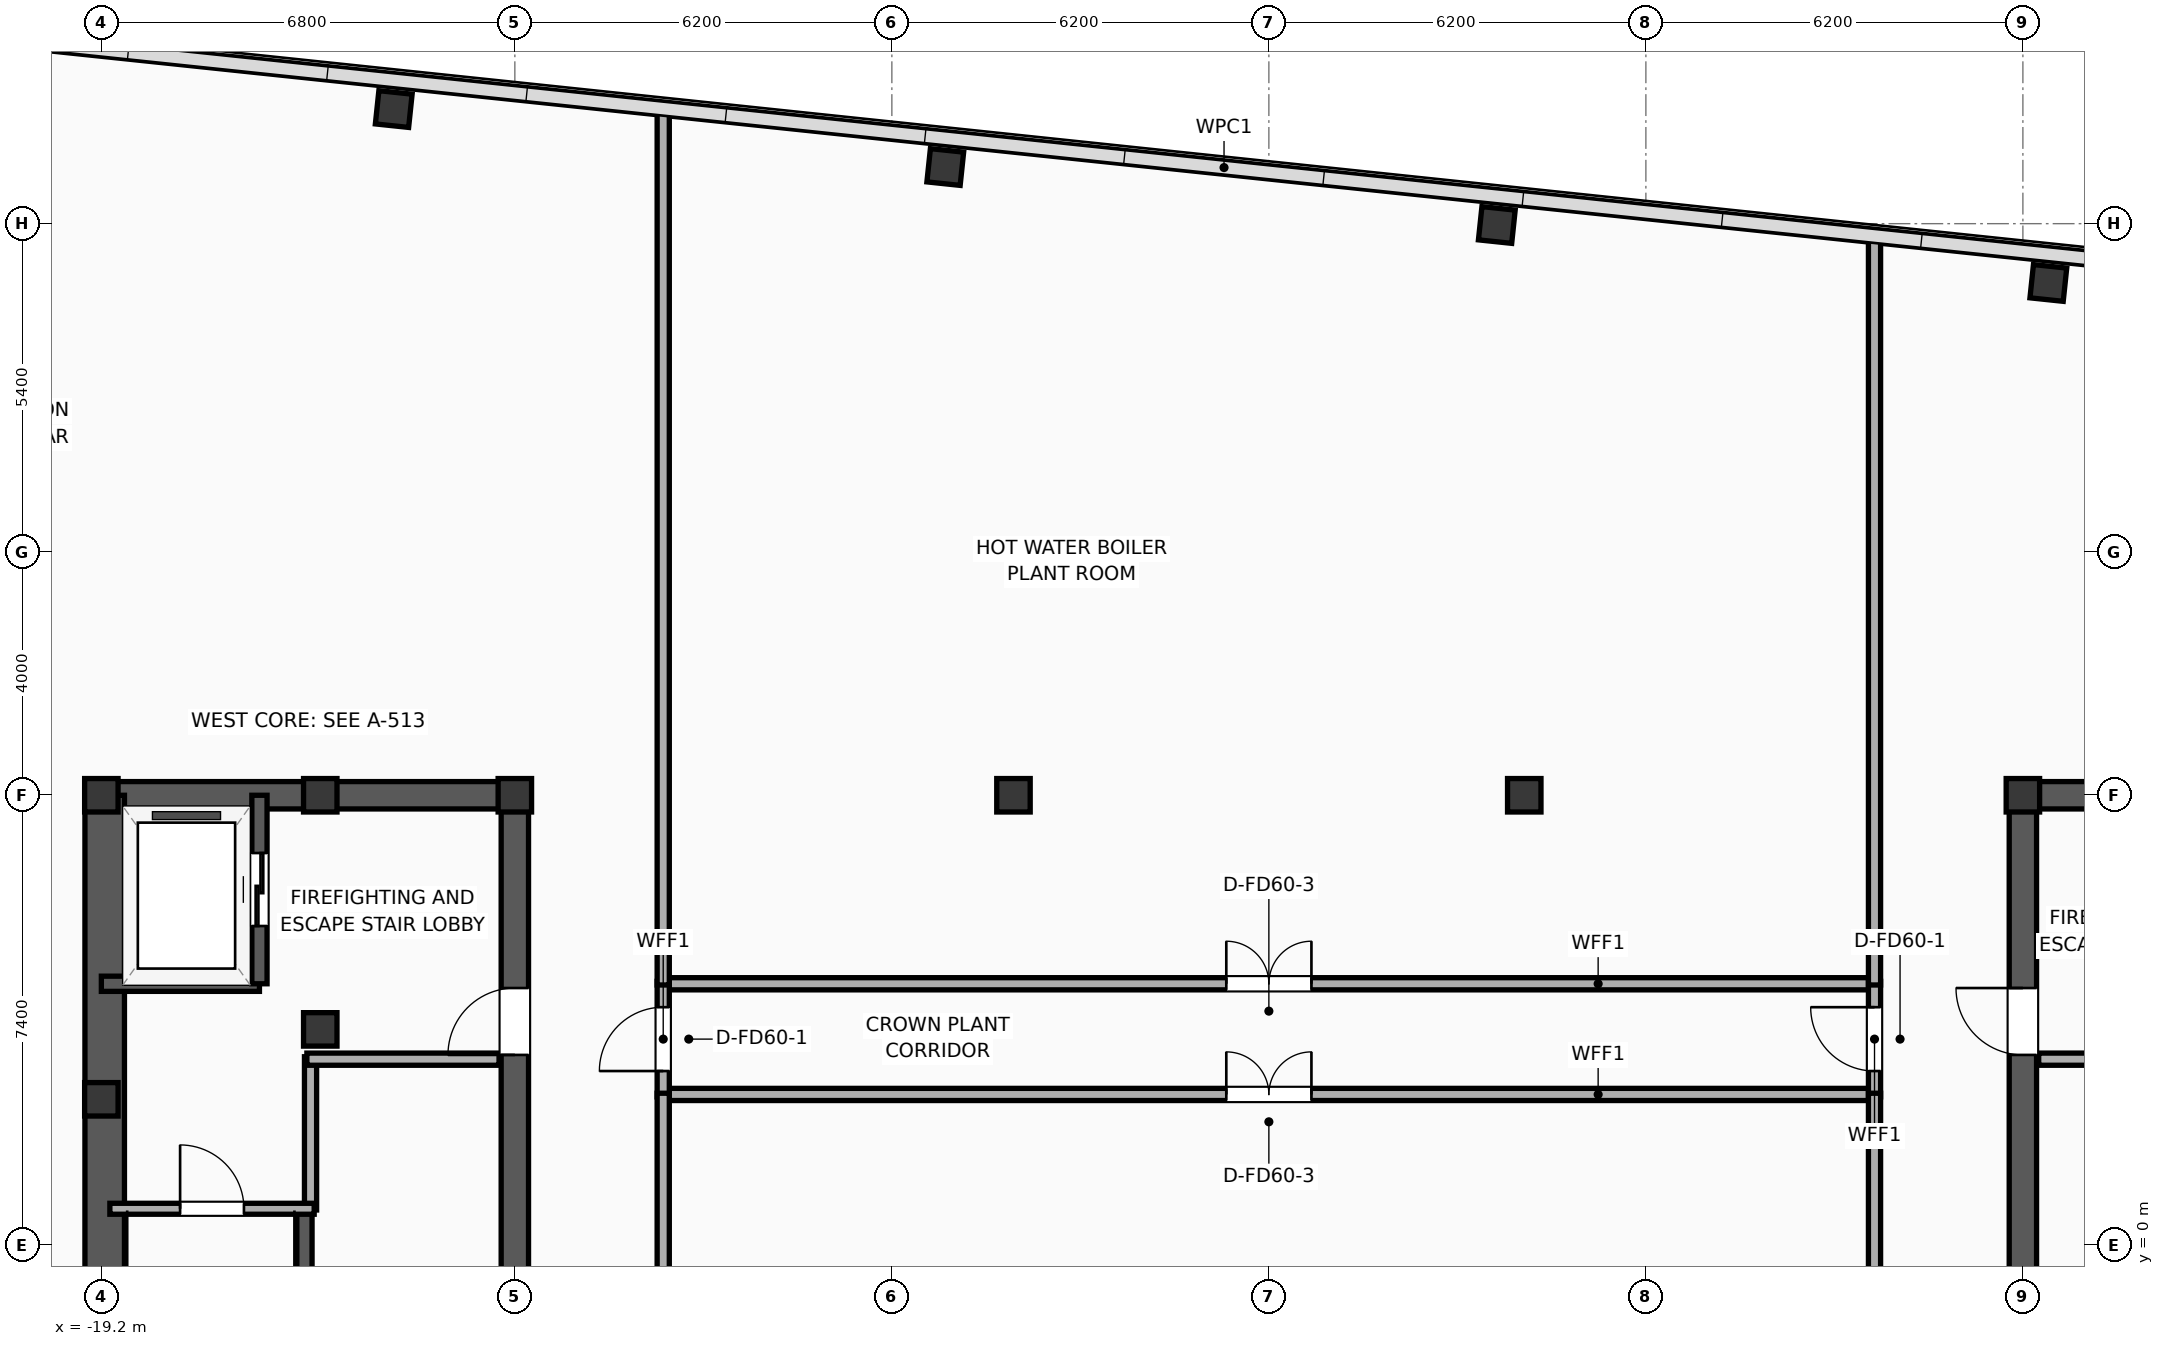
"""IFC4 building model, lengths in metres.
Left out: names, types, materials, properties, quantities, classifications, styles, units other than length and angle.
Written with IfcOpenShell. Run it as: python <this file> out.ifc"""

import sys

from ifc_helpers import new_model, si_unit, direction, frame, frame_2d, origin, origin_2d, place, context, subcontext, project, spatial, rectangle, hollow_rectangle, extrude, element, fill, save


model = new_model("IFC4")
c1 = context("Model", 3, precision=1e-05, world=origin(), true_north=direction((0.0, 1.0)))
c2 = subcontext(c1, "Body", "Model", "MODEL_VIEW")
j1 = project(units=[si_unit("LENGTHUNIT", "METRE"), si_unit("PLANEANGLEUNIT", "RADIAN")], contexts=[c1])
p1 = place(None, origin())
s1 = spatial("IfcSite", under=j1, at=p1, CompositionType="ELEMENT")
p2 = place(p1, origin())
s2 = spatial("IfcBuilding", under=s1, at=p2, CompositionType="ELEMENT")
p3 = place(p2, frame((0.0, 0.0, 316.0)))
s3 = spatial("IfcBuildingStorey", under=s2, at=p3, CompositionType="ELEMENT", Elevation=316.0)
for number, where, z_axis, x_axis in (
    (1, (-19.2, 2.4, 0.0), (0.0, 0.0, 1.0), (1.0, 0.0, 0.0)),
    (2, (-19.2, 7.4, 0.0), (0.0, 0.0, 1.0), (1.0, 0.0, 0.0)),
    (3, (-15.6, 7.4, 0.0), (0.0, 0.0, 1.0), (1.0, 0.0, 0.0)),
    (4, (-15.6, 3.55, 0.0), (0.0, 0.0, 1.0), (1.0, 0.0, 0.0)),
    (5, (-12.4, 7.4, 0.0), (0.0, 0.0, 1.0), (1.0, 0.0, 0.0)),
    (6, (12.4, 7.4, 0.0), (0.0, 0.0, 1.0), (1.0, 0.0, 0.0)),
):
    element("IfcColumn", number, at=place(p3, frame(where, z_axis=z_axis, x_axis=x_axis)), inside=s3, PredefinedType="COLUMN", context=c2, shape_type="SweptSolid", body=[
        extrude(hollow_rectangle(XDim=0.55, YDim=0.55, WallThickness=0.022, at=origin_2d()), origin(), (0.0, 0.0, 1.0), 5.3),
    ])
p4 = place(p3, frame((-19.425, 7.4, 0.0), z_axis=(0.0, 0.0, 1.0), x_axis=(1.0, 0.0, 0.0)))
e7 = element("IfcWall", 7, at=p4, inside=s3, PredefinedType="SHEAR", context=c2, shape_type="SweptSolid", body=[
    extrude(rectangle(XDim=7.25, YDim=0.45, at=frame_2d((3.625, 0.0))), origin(), (0.0, 0.0, 1.0), 5.025),
])
p5 = place(p3, frame((-19.145, -7.4, 0.0), z_axis=(0.0, 0.0, 1.0), x_axis=(0.0, 1.0, 0.0)))
e8 = element("IfcWall", 8, at=p5, inside=s3, PredefinedType="SHEAR", context=c2, shape_type="SweptSolid", body=[
    extrude(rectangle(XDim=14.8, YDim=0.65, at=frame_2d((7.4, 0.0))), origin(), (0.0, 0.0, 1.0), 5.025),
])
p6 = place(p3, frame((-12.4, -7.4, 0.0), z_axis=(0.0, 0.0, 1.0), x_axis=(0.0, 1.0, 0.0)))
e9 = element("IfcWall", 9, at=p6, inside=s3, PredefinedType="SHEAR", context=c2, shape_type="SweptSolid", body=[
    extrude(rectangle(XDim=14.8, YDim=0.45, at=frame_2d((7.4, 0.0))), origin(), (0.0, 0.0, 1.0), 5.025),
])
p7 = place(p6, frame((10.53, 0.0, 0.0)))
e10 = element("IfcOpeningElement", 10, at=p7, cuts=e9, PredefinedType="OPENING", context=c2, shape_type="SweptSolid", body=[
    extrude(rectangle(XDim=1.1, YDim=2.05, at=frame_2d((0.55, 1.025))), frame((0.0, 0.235, 0.0), z_axis=(0.0, -1.0, 0.0), x_axis=(1.0, 0.0, 0.0)), (0.0, 0.0, 1.0), 0.47),
])
p8 = place(p6, frame((4.45, 0.0, 0.0)))
e11 = element("IfcOpeningElement", 11, at=p8, cuts=e9, PredefinedType="OPENING", context=c2, shape_type="SweptSolid", body=[
    extrude(rectangle(XDim=0.9, YDim=2.05, at=frame_2d((0.45, 1.025))), frame((0.0, 0.235, 0.0), z_axis=(0.0, -1.0, 0.0), x_axis=(1.0, 0.0, 0.0)), (0.0, 0.0, 1.0), 0.47),
])
p9 = place(p3, frame((-15.86, -7.085, 0.0), z_axis=(0.0, 0.0, 1.0), x_axis=(0.0, 1.0, 0.0)))
e12 = element("IfcWall", 12, at=p9, inside=s3, PredefinedType="SOLIDWALL", context=c2, shape_type="SweptSolid", body=[
    extrude(rectangle(XDim=7.685, YDim=0.25, at=frame_2d((3.843, 0.0))), origin(), (0.0, 0.0, 1.0), 5.025),
])
p10 = place(p3, frame((12.175, 7.4, 0.0), z_axis=(0.0, 0.0, 1.0), x_axis=(1.0, 0.0, 0.0)))
e13 = element("IfcWall", 13, at=p10, inside=s3, PredefinedType="SHEAR", context=c2, shape_type="SweptSolid", body=[
    extrude(rectangle(XDim=7.25, YDim=0.45, at=frame_2d((3.625, 0.0))), origin(), (0.0, 0.0, 1.0), 5.025),
])
p11 = place(p3, frame((12.4, -7.4, 0.0), z_axis=(0.0, 0.0, 1.0), x_axis=(0.0, 1.0, 0.0)))
e14 = element("IfcWall", 14, at=p11, inside=s3, PredefinedType="SHEAR", context=c2, shape_type="SweptSolid", body=[
    extrude(rectangle(XDim=14.8, YDim=0.45, at=frame_2d((7.4, 0.0))), origin(), (0.0, 0.0, 1.0), 5.025),
])
p12 = place(p11, frame((10.53, 0.0, 0.0)))
e15 = element("IfcOpeningElement", 15, at=p12, cuts=e14, PredefinedType="OPENING", context=c2, shape_type="SweptSolid", body=[
    extrude(rectangle(XDim=1.1, YDim=2.05, at=frame_2d((0.55, 1.025))), frame((0.0, 0.235, 0.0), z_axis=(0.0, -1.0, 0.0), x_axis=(1.0, 0.0, 0.0)), (0.0, 0.0, 1.0), 0.47),
])
p13 = place(p11, frame((4.45, 0.0, 0.0)))
e16 = element("IfcOpeningElement", 16, at=p13, cuts=e14, PredefinedType="OPENING", context=c2, shape_type="SweptSolid", body=[
    extrude(rectangle(XDim=0.9, YDim=2.05, at=frame_2d((0.45, 1.025))), frame((0.0, 0.235, 0.0), z_axis=(0.0, -1.0, 0.0), x_axis=(1.0, 0.0, 0.0)), (0.0, 0.0, 1.0), 0.47),
])
for number, where, z_axis, x_axis in (
    (17, (-4.2, 7.4, 0.0), (0.0, 0.0, 1.0), (1.0, 0.0, 0.0)),
    (18, (4.2, 7.4, 0.0), (0.0, 0.0, 1.0), (1.0, 0.0, 0.0)),
    (19, (12.819, 15.825, 0.0), (0.0, 0.0, 1.0), (0.995, -0.105, 0.0)),
    (20, (3.749, 16.778, 0.0), (0.0, 0.0, 1.0), (0.995, -0.105, 0.0)),
    (21, (-5.322, 17.732, 0.0), (0.0, 0.0, 1.0), (0.995, -0.105, 0.0)),
    (22, (-14.392, 18.685, 0.0), (0.0, 0.0, 1.0), (0.995, -0.105, 0.0)),
):
    element("IfcColumn", number, at=place(p3, frame(where, z_axis=z_axis, x_axis=x_axis)), inside=s3, PredefinedType="COLUMN", context=c2, shape_type="SweptSolid", body=[
        extrude(hollow_rectangle(XDim=0.55, YDim=0.55, WallThickness=0.022, at=origin_2d()), origin(), (0.0, 0.0, 1.0), 5.3),
    ])
p14 = place(p3, frame((-23.395, 20.104, 0.0), z_axis=(0.0, 0.0, 1.0), x_axis=(0.994522116558, -0.104526358762, 0.0)))
e23 = element("IfcWall", 23, at=p14, inside=s3, PredefinedType="PARAPET", context=c2, shape_type="SweptSolid", body=[
    extrude(rectangle(XDim=45.564, YDim=0.22, at=frame_2d((22.782, 0.0))), origin(), (0.0, 0.0, 1.0), 1.2),
])
p15 = place(p3, frame((-19.2, 4.3, 0.0), z_axis=(0.0, 0.0, 1.0), x_axis=(1.0, 0.0, 0.0)))
e24 = element("IfcWall", 24, at=p15, inside=s3, PredefinedType="SOLIDWALL", context=c2, shape_type="SweptSolid", body=[
    extrude(rectangle(XDim=2.6, YDim=0.25, at=frame_2d((1.3, 0.0))), origin(), (0.0, 0.0, 1.0), 5.025),
])
p16 = place(p3, frame((-16.6, 4.3, 0.0), z_axis=(0.0, 0.0, 1.0), x_axis=(0.0, 1.0, 0.0)))
e25 = element("IfcWall", 25, at=p16, inside=s3, PredefinedType="SOLIDWALL", context=c2, shape_type="SweptSolid", body=[
    extrude(rectangle(XDim=3.1, YDim=0.25, at=frame_2d((1.55, 0.0))), origin(), (0.0, 0.0, 1.0), 5.025),
])
p17 = place(p16, frame((0.95, 0.0, 0.0)))
e26 = element("IfcOpeningElement", 26, at=p17, cuts=e25, PredefinedType="OPENING", context=c2, shape_type="SweptSolid", body=[
    extrude(rectangle(XDim=1.2, YDim=2.05, at=frame_2d((0.6, 1.025))), frame((0.0, 0.135, 0.0), z_axis=(0.0, -1.0, 0.0), x_axis=(1.0, 0.0, 0.0)), (0.0, 0.0, 1.0), 0.27),
])
p18 = place(p3, frame((-15.76, 0.58, 0.0), z_axis=(0.0, 0.0, 1.0), x_axis=(0.0, 1.0, 0.0)))
e27 = element("IfcWall", 27, at=p18, inside=s3, PredefinedType="PARTITIONING", context=c2, shape_type="SweptSolid", body=[
    extrude(rectangle(XDim=2.52, YDim=0.2, at=frame_2d((1.26, 0.0))), origin(), (0.0, 0.0, 1.0), 5.025),
])
p19 = place(p3, frame((-15.82, 3.06, 0.0), z_axis=(0.0, 0.0, 1.0), x_axis=(1.0, 0.0, 0.0)))
e28 = element("IfcWall", 28, at=p19, inside=s3, PredefinedType="PARTITIONING", context=c2, shape_type="SweptSolid", body=[
    extrude(rectangle(XDim=3.16, YDim=0.2, at=frame_2d((1.58, 0.0))), origin(), (0.0, 0.0, 1.0), 5.025),
])
p20 = place(p3, frame((-19.06, 0.6, 0.0), z_axis=(0.0, 0.0, 1.0), x_axis=(1.0, 0.0, 0.0)))
e29 = element("IfcWall", 29, at=p20, inside=s3, PredefinedType="PARTITIONING", context=c2, shape_type="SweptSolid", body=[
    extrude(rectangle(XDim=3.36, YDim=0.18, at=frame_2d((1.68, 0.0))), origin(), (0.0, 0.0, 1.0), 5.025),
])
p21 = place(p20, frame((1.155, 0.0, 0.0)))
e30 = element("IfcOpeningElement", 30, at=p21, cuts=e29, PredefinedType="OPENING", context=c2, shape_type="SweptSolid", body=[
    extrude(rectangle(XDim=1.05, YDim=2.05, at=frame_2d((0.525, 1.025))), frame((0.0, 0.1, 0.0), z_axis=(0.0, -1.0, 0.0), x_axis=(1.0, 0.0, 0.0)), (0.0, 0.0, 1.0), 0.2),
])
p22 = place(p3, frame((12.66, 3.06, 0.0), z_axis=(0.0, 0.0, 1.0), x_axis=(1.0, 0.0, 0.0)))
e31 = element("IfcWall", 31, at=p22, inside=s3, PredefinedType="PARTITIONING", context=c2, shape_type="SweptSolid", body=[
    extrude(rectangle(XDim=3.16, YDim=0.2, at=frame_2d((1.58, 0.0))), origin(), (0.0, 0.0, 1.0), 5.025),
])
p23 = place(p3, frame((-9.98, 2.48, 0.0), z_axis=(0.0, 0.0, 1.0), x_axis=(1.0, 0.0, 0.0)))
e32 = element("IfcWall", 32, at=p23, inside=s3, PredefinedType="PARTITIONING", context=c2, shape_type="SweptSolid", body=[
    extrude(rectangle(XDim=19.96, YDim=0.2, at=frame_2d((9.98, 0.0))), origin(), (0.0, 0.0, 1.0), 4.595),
])
p24 = place(p23, frame((9.28, 0.0, 0.0)))
e33 = element("IfcOpeningElement", 33, at=p24, cuts=e32, PredefinedType="OPENING", context=c2, shape_type="SweptSolid", body=[
    extrude(rectangle(XDim=1.4, YDim=2.05, at=frame_2d((0.7, 1.025))), frame((0.0, 0.11, 0.0), z_axis=(0.0, -1.0, 0.0), x_axis=(1.0, 0.0, 0.0)), (0.0, 0.0, 1.0), 0.22),
])
p25 = place(p3, frame((-9.98, 4.3, 0.0), z_axis=(0.0, 0.0, 1.0), x_axis=(1.0, 0.0, 0.0)))
e34 = element("IfcWall", 34, at=p25, inside=s3, PredefinedType="PARTITIONING", context=c2, shape_type="SweptSolid", body=[
    extrude(rectangle(XDim=19.96, YDim=0.2, at=frame_2d((9.98, 0.0))), origin(), (0.0, 0.0, 1.0), 5.025),
])
p26 = place(p25, frame((9.28, 0.0, 0.0)))
e35 = element("IfcOpeningElement", 35, at=p26, cuts=e34, PredefinedType="OPENING", context=c2, shape_type="SweptSolid", body=[
    extrude(rectangle(XDim=1.4, YDim=2.05, at=frame_2d((0.7, 1.025))), frame((0.0, 0.11, 0.0), z_axis=(0.0, -1.0, 0.0), x_axis=(1.0, 0.0, 0.0)), (0.0, 0.0, 1.0), 0.22),
])
p27 = place(p3, frame((-9.96, 2.44, 0.0), z_axis=(0.0, 0.0, 1.0), x_axis=(0.0, 1.0, 0.0)))
e36 = element("IfcWall", 36, at=p27, inside=s3, PredefinedType="PARTITIONING", context=c2, shape_type="SweptSolid", body=[
    extrude(rectangle(XDim=1.9, YDim=0.2, at=frame_2d((0.95, 0.0))), origin(), (0.0, 0.0, 1.0), 5.025),
])
p28 = place(p27, frame((0.425, 0.0, 0.0)))
e37 = element("IfcOpeningElement", 37, at=p28, cuts=e36, PredefinedType="OPENING", context=c2, shape_type="SweptSolid", body=[
    extrude(rectangle(XDim=1.05, YDim=2.05, at=frame_2d((0.525, 1.025))), frame((0.0, 0.11, 0.0), z_axis=(0.0, -1.0, 0.0), x_axis=(1.0, 0.0, 0.0)), (0.0, 0.0, 1.0), 0.22),
])
p29 = place(p3, frame((9.96, 2.44, 0.0), z_axis=(0.0, 0.0, 1.0), x_axis=(0.0, 1.0, 0.0)))
e38 = element("IfcWall", 38, at=p29, inside=s3, PredefinedType="PARTITIONING", context=c2, shape_type="SweptSolid", body=[
    extrude(rectangle(XDim=1.9, YDim=0.2, at=frame_2d((0.95, 0.0))), origin(), (0.0, 0.0, 1.0), 5.025),
])
p30 = place(p29, frame((0.425, 0.0, 0.0)))
e39 = element("IfcOpeningElement", 39, at=p30, cuts=e38, PredefinedType="OPENING", context=c2, shape_type="SweptSolid", body=[
    extrude(rectangle(XDim=1.05, YDim=2.05, at=frame_2d((0.525, 1.025))), frame((0.0, 0.11, 0.0), z_axis=(0.0, -1.0, 0.0), x_axis=(1.0, 0.0, 0.0)), (0.0, 0.0, 1.0), 0.22),
])
p31 = place(p3, frame((-9.96, -17.125, 0.0), z_axis=(0.0, 0.0, 1.0), x_axis=(0.0, 1.0, 0.0)))
e40 = element("IfcWall", 40, at=p31, inside=s3, PredefinedType="PARTITIONING", context=c2, shape_type="SweptSolid", body=[
    extrude(rectangle(XDim=19.625, YDim=0.2, at=frame_2d((9.812, 0.0))), origin(), (0.0, 0.0, 1.0), 3.915),
])
p32 = place(p3, frame((-9.96, 4.28, 0.0), z_axis=(0.0, 0.0, 1.0), x_axis=(0.0, 1.0, 0.0)))
e41 = element("IfcWall", 41, at=p32, inside=s3, PredefinedType="PARTITIONING", context=c2, shape_type="SweptSolid", body=[
    extrude(rectangle(XDim=14.392, YDim=0.2, at=frame_2d((7.196, 0.0))), origin(), (0.0, 0.0, 1.0), 5.025),
])
p33 = place(p3, frame((9.96, -19.218, 0.0), z_axis=(0.0, 0.0, 1.0), x_axis=(0.0, 1.0, 0.0)))
e42 = element("IfcWall", 42, at=p33, inside=s3, PredefinedType="PARTITIONING", context=c2, shape_type="SweptSolid", body=[
    extrude(rectangle(XDim=21.718, YDim=0.2, at=frame_2d((10.859, 0.0))), origin(), (0.0, 0.0, 1.0), 3.915),
])
p34 = place(p3, frame((9.96, 4.28, 0.0), z_axis=(0.0, 0.0, 1.0), x_axis=(0.0, 1.0, 0.0)))
e43 = element("IfcWall", 43, at=p34, inside=s3, PredefinedType="PARTITIONING", context=c2, shape_type="SweptSolid", body=[
    extrude(rectangle(XDim=12.298, YDim=0.2, at=frame_2d((6.149, 0.0))), origin(), (0.0, 0.0, 1.0), 5.025),
])
p35 = place(p17, origin())
e44 = element("IfcDoor", 44, at=p35, inside=s3, OperationType="SLIDING_TO_LEFT", PredefinedType="DOOR", context=c2, shape_type="SweptSolid", body=[
    extrude(rectangle(XDim=1.2, YDim=2.05, at=frame_2d((0.6, 1.025))), frame((0.0, 0.025, 0.0), z_axis=(0.0, -1.0, 0.0), x_axis=(1.0, 0.0, 0.0)), (0.0, 0.0, 1.0), 0.05),
])
fill(e26, e44)
p36 = place(p21, origin())
e45 = element("IfcDoor", 45, at=p36, inside=s3, OperationType="SINGLE_SWING_LEFT", PredefinedType="DOOR", context=c2, shape_type="SweptSolid", body=[
    extrude(rectangle(XDim=1.05, YDim=2.05, at=frame_2d((0.525, 1.025))), frame((0.0, 0.025, 0.0), z_axis=(0.0, -1.0, 0.0), x_axis=(1.0, 0.0, 0.0)), (0.0, 0.0, 1.0), 0.05),
])
fill(e30, e45)
p37 = place(p24, origin())
e46 = element("IfcDoor", 46, at=p37, inside=s3, OperationType="DOUBLE_DOOR_SINGLE_SWING", PredefinedType="DOOR", context=c2, shape_type="SweptSolid", body=[
    extrude(rectangle(XDim=1.4, YDim=2.05, at=frame_2d((0.7, 1.025))), frame((0.0, 0.025, 0.0), z_axis=(0.0, -1.0, 0.0), x_axis=(1.0, 0.0, 0.0)), (0.0, 0.0, 1.0), 0.05),
])
fill(e33, e46)
p38 = place(p26, origin())
e47 = element("IfcDoor", 47, at=p38, inside=s3, OperationType="DOUBLE_DOOR_SINGLE_SWING", PredefinedType="DOOR", context=c2, shape_type="SweptSolid", body=[
    extrude(rectangle(XDim=1.4, YDim=2.05, at=frame_2d((0.7, 1.025))), frame((0.0, 0.025, 0.0), z_axis=(0.0, -1.0, 0.0), x_axis=(1.0, 0.0, 0.0)), (0.0, 0.0, 1.0), 0.05),
])
fill(e35, e47)
p39 = place(p28, origin())
e48 = element("IfcDoor", 48, at=p39, inside=s3, OperationType="SINGLE_SWING_LEFT", PredefinedType="DOOR", context=c2, shape_type="SweptSolid", body=[
    extrude(rectangle(XDim=1.05, YDim=2.05, at=frame_2d((0.525, 1.025))), frame((0.0, 0.025, 0.0), z_axis=(0.0, -1.0, 0.0), x_axis=(1.0, 0.0, 0.0)), (0.0, 0.0, 1.0), 0.05),
])
fill(e37, e48)
p40 = place(p30, origin())
e49 = element("IfcDoor", 49, at=p40, inside=s3, OperationType="SINGLE_SWING_RIGHT", PredefinedType="DOOR", context=c2, shape_type="SweptSolid", body=[
    extrude(rectangle(XDim=1.05, YDim=2.05, at=frame_2d((0.525, 1.025))), frame((0.0, 0.025, 0.0), z_axis=(0.0, -1.0, 0.0), x_axis=(1.0, 0.0, 0.0)), (0.0, 0.0, 1.0), 0.05),
])
fill(e39, e49)
p41 = place(p7, origin())
e50 = element("IfcDoor", 50, at=p41, inside=s3, OperationType="SINGLE_SWING_LEFT", PredefinedType="DOOR", context=c2, shape_type="SweptSolid", body=[
    extrude(rectangle(XDim=1.1, YDim=2.05, at=frame_2d((0.55, 1.025))), frame((0.0, 0.025, 0.0), z_axis=(0.0, -1.0, 0.0), x_axis=(1.0, 0.0, 0.0)), (0.0, 0.0, 1.0), 0.05),
])
fill(e10, e50)
p42 = place(p12, origin())
e51 = element("IfcDoor", 51, at=p42, inside=s3, OperationType="SINGLE_SWING_RIGHT", PredefinedType="DOOR", context=c2, shape_type="SweptSolid", body=[
    extrude(rectangle(XDim=1.1, YDim=2.05, at=frame_2d((0.55, 1.025))), frame((0.0, 0.025, 0.0), z_axis=(0.0, -1.0, 0.0), x_axis=(1.0, 0.0, 0.0)), (0.0, 0.0, 1.0), 0.05),
])
fill(e15, e51)
save(model, sys.argv[1])
